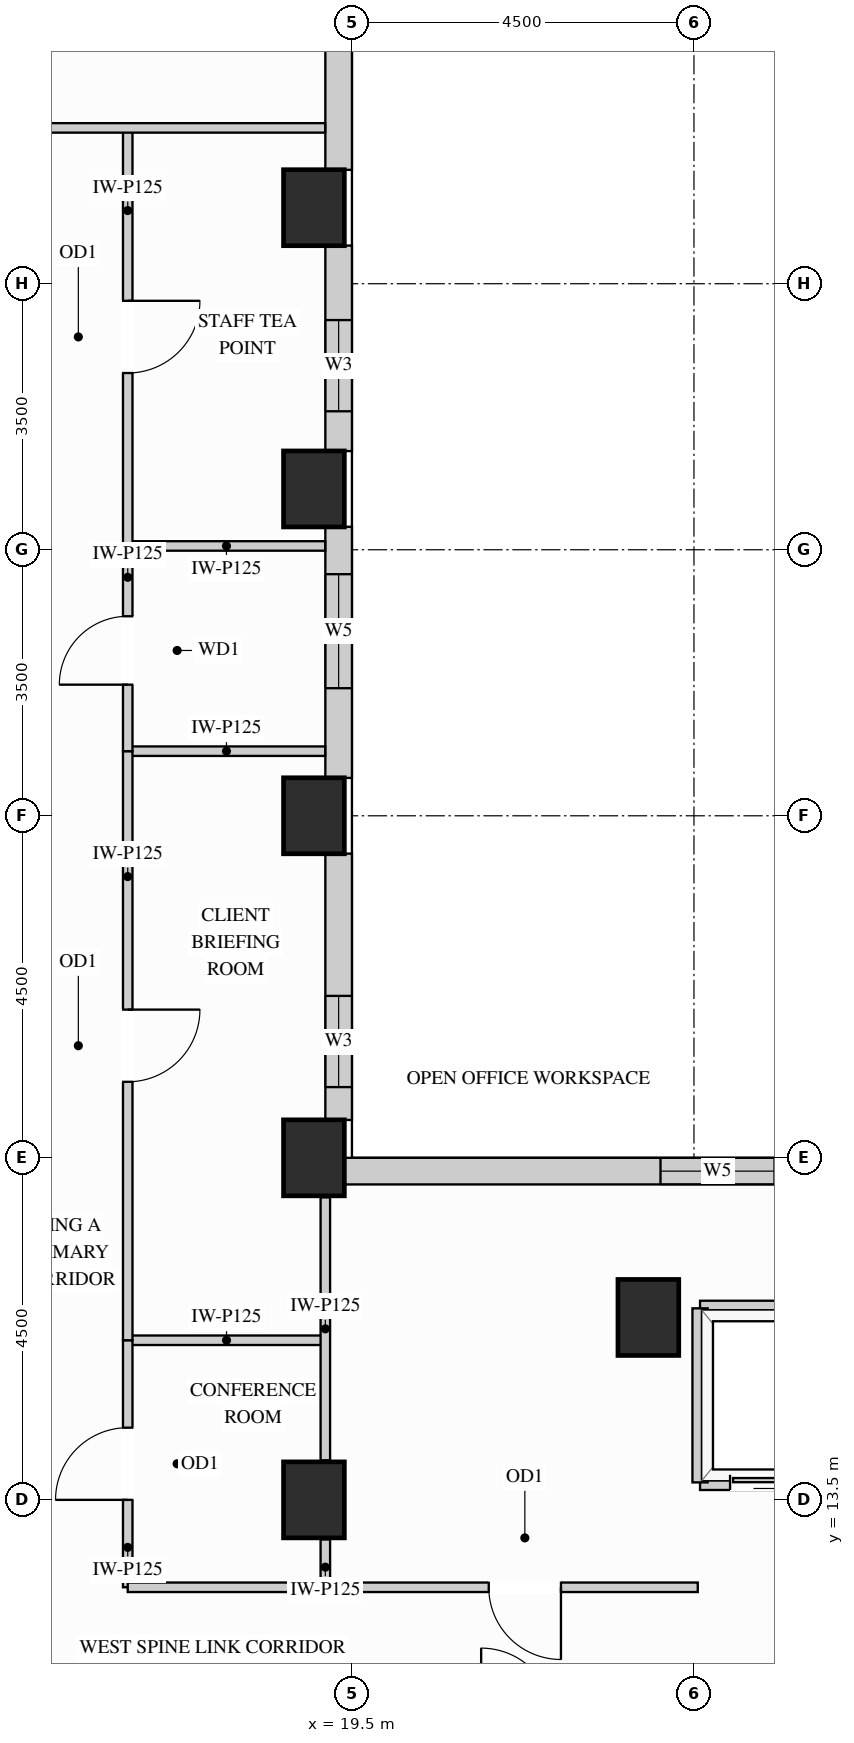
"""IFC4 building model, lengths in metres.
Left out: names, types, materials, properties, quantities, classifications, styles, units other than length and angle.
Written with IfcOpenShell. Run it as: python <this file> out.ifc"""

import sys

from ifc_helpers import new_model, si_unit, direction, frame, frame_2d, origin, origin_2d, place, context, subcontext, project, spatial, rectangle, extrude, source, transform, mapped, element, fill, save


model = new_model("IFC4")
c1 = context("Model", 3, precision=1e-05, world=origin(), true_north=direction((0.0, 1.0)))
c2 = subcontext(c1, "Body", "Model", "MODEL_VIEW")
j1 = project(units=[si_unit("LENGTHUNIT", "METRE"), si_unit("PLANEANGLEUNIT", "RADIAN")], contexts=[c1])
p1 = place(None, origin())
s1 = spatial("IfcSite", under=j1, at=p1, CompositionType="ELEMENT")
p2 = place(p1, origin())
s2 = spatial("IfcBuilding", under=s1, at=p2, CompositionType="ELEMENT")
p3 = place(p2, frame((0.0, 0.0, 189.9)))
s3 = spatial("IfcBuildingStorey", under=s2, at=p3, CompositionType="ELEMENT", Elevation=189.9)
m1 = source(origin(), c2, "Body", "SweptSolid", [
    extrude(rectangle(XDim=0.8, YDim=1.0, at=origin_2d()), origin(), (0.0, 0.0, 1.0), 3.4),
])
for number, where, z_axis, x_axis in (
    (1, (19.0, 13.5, 0.0), (0.0, 0.0, 1.0), (1.0, 0.0, 0.0)),
    (2, (19.0, 18.0, 0.0), (0.0, 0.0, 1.0), (1.0, 0.0, 0.0)),
    (3, (19.0, 22.5, 0.0), (0.0, 0.0, 1.0), (1.0, 0.0, 0.0)),
    (4, (19.0, 26.8, 0.0), (0.0, 0.0, 1.0), (1.0, 0.0, 0.0)),
    (5, (19.0, 30.5, 0.0), (0.0, 0.0, 1.0), (1.0, 0.0, 0.0)),
    (6, (23.4, 15.9, 0.0), (0.0, 0.0, 1.0), (1.0, 0.0, 0.0)),
):
    element("IfcColumn", number, at=place(p3, frame(where, z_axis=z_axis, x_axis=x_axis)), inside=s3, PredefinedType="COLUMN", context=c2, shape_type="MappedRepresentation", body=[
        mapped(m1, transform((0.0, 0.0, 0.0), x_axis=(1.0, 0.0, 0.0), y_axis=(0.0, 1.0, 0.0), z_axis=(0.0, 0.0, 1.0))),
    ])
p4 = place(p3, frame((34.502, 17.825, 0.0), z_axis=(0.0, 0.0, 1.0), x_axis=(-1.0, 0.0, 0.0)))
e7 = element("IfcWall", 7, at=p4, inside=s3, PredefinedType="SOLIDWALL", context=c2, shape_type="SweptSolid", body=[
    extrude(rectangle(XDim=15.104, YDim=0.35, at=frame_2d((7.552, 0.0))), origin(), (0.0, 0.0, 1.0), 3.385),
])
p5 = place(p4, frame((4.131, 0.0, 0.78)))
e8 = element("IfcOpeningElement", 8, at=p5, cuts=e7, PredefinedType="OPENING", context=c2, shape_type="SweptSolid", body=[
    extrude(rectangle(XDim=1.5, YDim=2.0, at=frame_2d((0.75, 1.0))), frame((0.0, 0.185, 0.0), z_axis=(0.0, -1.0, 0.0), x_axis=(1.0, 0.0, 0.0)), (0.0, 0.0, 1.0), 0.37),
])
p6 = place(p4, frame((9.442, 0.0, 0.78)))
e9 = element("IfcOpeningElement", 9, at=p6, cuts=e7, PredefinedType="OPENING", context=c2, shape_type="SweptSolid", body=[
    extrude(rectangle(XDim=1.5, YDim=2.0, at=frame_2d((0.75, 1.0))), frame((0.0, 0.185, 0.0), z_axis=(0.0, -1.0, 0.0), x_axis=(1.0, 0.0, 0.0)), (0.0, 0.0, 1.0), 0.37),
])
p7 = place(p3, frame((19.325, 18.498, 0.0), z_axis=(0.0, 0.0, 1.0), x_axis=(0.0, 1.0, 0.0)))
e10 = element("IfcWall", 10, at=p7, inside=s3, PredefinedType="SOLIDWALL", context=c2, shape_type="SweptSolid", body=[
    extrude(rectangle(XDim=3.504, YDim=0.35, at=frame_2d((1.752, 0.0))), origin(), (0.0, 0.0, 1.0), 2.612),
])
p8 = place(p7, frame((0.433, 0.0, 0.78)))
e11 = element("IfcOpeningElement", 11, at=p8, cuts=e10, PredefinedType="OPENING", context=c2, shape_type="SweptSolid", body=[
    extrude(rectangle(XDim=1.2, YDim=1.652, at=frame_2d((0.6, 0.826))), frame((0.0, 0.185, 0.0), z_axis=(0.0, -1.0, 0.0), x_axis=(1.0, 0.0, 0.0)), (0.0, 0.0, 1.0), 0.37),
])
p9 = place(p3, frame((19.325, 22.998, 0.0), z_axis=(0.0, 0.0, 1.0), x_axis=(0.0, 1.0, 0.0)))
e12 = element("IfcWall", 12, at=p9, inside=s3, PredefinedType="SOLIDWALL", context=c2, shape_type="SweptSolid", body=[
    extrude(rectangle(XDim=3.304, YDim=0.35, at=frame_2d((1.652, 0.0))), origin(), (0.0, 0.0, 1.0), 2.612),
])
p10 = place(p9, frame((1.18, 0.0, 0.78)))
e13 = element("IfcOpeningElement", 13, at=p10, cuts=e12, PredefinedType="OPENING", context=c2, shape_type="SweptSolid", body=[
    extrude(rectangle(XDim=1.5, YDim=1.652, at=frame_2d((0.75, 0.826))), frame((0.0, 0.185, 0.0), z_axis=(0.0, -1.0, 0.0), x_axis=(1.0, 0.0, 0.0)), (0.0, 0.0, 1.0), 0.37),
])
p11 = place(p3, frame((19.325, 27.298, 0.0), z_axis=(0.0, 0.0, 1.0), x_axis=(0.0, 1.0, 0.0)))
e14 = element("IfcWall", 14, at=p11, inside=s3, PredefinedType="SOLIDWALL", context=c2, shape_type="SweptSolid", body=[
    extrude(rectangle(XDim=2.704, YDim=0.35, at=frame_2d((1.352, 0.0))), origin(), (0.0, 0.0, 1.0), 2.612),
])
p12 = place(p11, frame((0.524, 0.0, 0.78)))
e15 = element("IfcOpeningElement", 15, at=p12, cuts=e14, PredefinedType="OPENING", context=c2, shape_type="SweptSolid", body=[
    extrude(rectangle(XDim=1.2, YDim=1.652, at=frame_2d((0.6, 0.826))), frame((0.0, 0.185, 0.0), z_axis=(0.0, -1.0, 0.0), x_axis=(1.0, 0.0, 0.0)), (0.0, 0.0, 1.0), 0.37),
])
m2 = source(origin(), c2, "Body", "SweptSolid", [
    extrude(rectangle(XDim=3.504, YDim=0.35, at=frame_2d((1.752, 0.0))), origin(), (0.0, 0.0, 1.0), 2.612),
])
p13 = place(p3, frame((19.325, 30.998, 0.0), z_axis=(0.0, 0.0, 1.0), x_axis=(0.0, 1.0, 0.0)))
e16 = element("IfcWall", 16, at=p13, inside=s3, PredefinedType="SOLIDWALL", context=c2, shape_type="MappedRepresentation", body=[
    mapped(m2, transform((0.0, 0.0, 0.0), x_axis=(1.0, 0.0, 0.0), y_axis=(0.0, 1.0, 0.0), z_axis=(0.0, 0.0, 1.0))),
])
m3 = source(origin(), c2, "Body", "SweptSolid", [
    extrude(rectangle(XDim=2.6, YDim=0.125, at=frame_2d((1.3, 0.0))), origin(), (0.0, 0.0, 1.0), 3.385),
])
p14 = place(p3, frame((16.55, 15.6, 0.0), z_axis=(0.0, 0.0, 1.0), x_axis=(1.0, 0.0, 0.0)))
e17 = element("IfcWall", 17, at=p14, inside=s3, PredefinedType="PARTITIONING", context=c2, shape_type="MappedRepresentation", body=[
    mapped(m3, transform((0.0, 0.0, 0.0), x_axis=(1.0, 0.0, 0.0), y_axis=(0.0, 1.0, 0.0), z_axis=(0.0, 0.0, 1.0))),
])
m4 = source(origin(), c2, "Body", "SweptSolid", [
    extrude(rectangle(XDim=2.598, YDim=0.125, at=frame_2d((1.299, 0.0))), origin(), (0.0, 0.0, 1.0), 3.385),
])
for number, where, z_axis, x_axis in (
    (18, (16.55, 23.35, 0.0), (0.0, 0.0, 1.0), (1.0, 0.0, 0.0)),
    (19, (16.55, 26.05, 0.0), (0.0, 0.0, 1.0), (1.0, 0.0, 0.0)),
):
    element("IfcWall", number, at=place(p3, frame(where, z_axis=z_axis, x_axis=x_axis)), inside=s3, PredefinedType="PARTITIONING", context=c2, shape_type="MappedRepresentation", body=[
        mapped(m4, transform((0.0, 0.0, 0.0), x_axis=(1.0, 0.0, 0.0), y_axis=(0.0, 1.0, 0.0), z_axis=(0.0, 0.0, 1.0))),
    ])
m5 = source(origin(), c2, "Body", "SweptSolid", [
    extrude(rectangle(XDim=0.63, YDim=0.125, at=frame_2d((0.315, 0.0))), origin(), (0.0, 0.0, 1.0), 2.773),
])
p15 = place(p3, frame((19.15, 12.35, 0.0), z_axis=(0.0, 0.0, 1.0), x_axis=(0.0, 1.0, 0.0)))
e20 = element("IfcWall", 20, at=p15, inside=s3, PredefinedType="PARTITIONING", context=c2, shape_type="MappedRepresentation", body=[
    mapped(m5, transform((0.0, 0.0, 0.0), x_axis=(1.0, 0.0, 0.0), y_axis=(0.0, 1.0, 0.0), z_axis=(0.0, 0.0, 1.0))),
])
m6 = source(origin(), c2, "Body", "SweptSolid", [
    extrude(rectangle(XDim=3.46, YDim=0.125, at=frame_2d((1.73, 0.0))), origin(), (0.0, 0.0, 1.0), 2.773),
])
p16 = place(p3, frame((19.15, 14.02, 0.0), z_axis=(0.0, 0.0, 1.0), x_axis=(0.0, 1.0, 0.0)))
e21 = element("IfcWall", 21, at=p16, inside=s3, PredefinedType="PARTITIONING", context=c2, shape_type="MappedRepresentation", body=[
    mapped(m6, transform((0.0, 0.0, 0.0), x_axis=(1.0, 0.0, 0.0), y_axis=(0.0, 1.0, 0.0), z_axis=(0.0, 0.0, 1.0))),
])
p17 = place(p3, frame((16.55, 12.35, 0.0), z_axis=(0.0, 0.0, 1.0), x_axis=(0.0, 1.0, 0.0)))
e22 = element("IfcWall", 22, at=p17, inside=s3, PredefinedType="PARTITIONING", context=c2, shape_type="SweptSolid", body=[
    extrude(rectangle(XDim=3.25, YDim=0.125, at=frame_2d((1.625, 0.0))), origin(), (0.0, 0.0, 1.0), 3.385),
])
p18 = place(p17, frame((1.15, 0.0, 0.0)))
e23 = element("IfcOpeningElement", 23, at=p18, cuts=e22, PredefinedType="OPENING", context=c2, shape_type="SweptSolid", body=[
    extrude(rectangle(XDim=0.95, YDim=2.15, at=frame_2d((0.475, 1.075))), frame((0.0, 0.073, 0.0), z_axis=(0.0, -1.0, 0.0), x_axis=(1.0, 0.0, 0.0)), (0.0, 0.0, 1.0), 0.145),
])
p19 = place(p3, frame((16.55, 15.6, 0.0), z_axis=(0.0, 0.0, 1.0), x_axis=(0.0, 1.0, 0.0)))
e24 = element("IfcWall", 24, at=p19, inside=s3, PredefinedType="PARTITIONING", context=c2, shape_type="SweptSolid", body=[
    extrude(rectangle(XDim=7.75, YDim=0.125, at=frame_2d((3.875, 0.0))), origin(), (0.0, 0.0, 1.0), 3.385),
])
p20 = place(p19, frame((3.4, 0.0, 0.0)))
e25 = element("IfcOpeningElement", 25, at=p20, cuts=e24, PredefinedType="OPENING", context=c2, shape_type="SweptSolid", body=[
    extrude(rectangle(XDim=0.95, YDim=2.15, at=frame_2d((0.475, 1.075))), frame((0.0, 0.073, 0.0), z_axis=(0.0, -1.0, 0.0), x_axis=(1.0, 0.0, 0.0)), (0.0, 0.0, 1.0), 0.145),
])
p21 = place(p3, frame((16.55, 26.05, 0.0), z_axis=(0.0, 0.0, 1.0), x_axis=(0.0, 1.0, 0.0)))
e26 = element("IfcWall", 26, at=p21, inside=s3, PredefinedType="PARTITIONING", context=c2, shape_type="SweptSolid", body=[
    extrude(rectangle(XDim=5.5, YDim=0.125, at=frame_2d((2.75, 0.0))), origin(), (0.0, 0.0, 1.0), 3.385),
])
p22 = place(p21, frame((2.275, 0.0, 0.0)))
e27 = element("IfcOpeningElement", 27, at=p22, cuts=e26, PredefinedType="OPENING", context=c2, shape_type="SweptSolid", body=[
    extrude(rectangle(XDim=0.95, YDim=2.15, at=frame_2d((0.475, 1.075))), frame((0.0, 0.073, 0.0), z_axis=(0.0, -1.0, 0.0), x_axis=(1.0, 0.0, 0.0)), (0.0, 0.0, 1.0), 0.145),
])
p23 = place(p3, frame((16.55, 23.35, 0.0), z_axis=(0.0, 0.0, 1.0), x_axis=(0.0, 1.0, 0.0)))
e28 = element("IfcWall", 28, at=p23, inside=s3, PredefinedType="PARTITIONING", context=c2, shape_type="SweptSolid", body=[
    extrude(rectangle(XDim=2.7, YDim=0.125, at=frame_2d((1.35, 0.0))), origin(), (0.0, 0.0, 1.0), 3.385),
])
p24 = place(p23, frame((0.875, 0.0, 0.0)))
e29 = element("IfcOpeningElement", 29, at=p24, cuts=e28, PredefinedType="OPENING", context=c2, shape_type="SweptSolid", body=[
    extrude(rectangle(XDim=0.9, YDim=2.15, at=frame_2d((0.45, 1.075))), frame((0.0, 0.073, 0.0), z_axis=(0.0, -1.0, 0.0), x_axis=(1.0, 0.0, 0.0)), (0.0, 0.0, 1.0), 0.145),
])
m7 = source(origin(), c2, "Body", "SweptSolid", [
    extrude(rectangle(XDim=12.598, YDim=0.125, at=frame_2d((6.299, 0.0))), origin(), (0.0, 0.0, 1.0), 3.385),
])
p25 = place(p3, frame((6.55, 31.55, 0.0), z_axis=(0.0, 0.0, 1.0), x_axis=(1.0, 0.0, 0.0)))
e30 = element("IfcWall", 30, at=p25, inside=s3, PredefinedType="PARTITIONING", context=c2, shape_type="MappedRepresentation", body=[
    mapped(m7, transform((0.0, 0.0, 0.0), x_axis=(1.0, 0.0, 0.0), y_axis=(0.0, 1.0, 0.0), z_axis=(0.0, 0.0, 1.0))),
])
m8 = source(origin(), c2, "Body", "SweptSolid", [
    extrude(rectangle(XDim=2.95, YDim=0.125, at=frame_2d((1.475, 0.0))), origin(), (0.0, 0.0, 1.0), 3.385),
])
p26 = place(p3, frame((16.55, 12.35, 0.0), z_axis=(0.0, 0.0, 1.0), x_axis=(1.0, 0.0, 0.0)))
e31 = element("IfcWall", 31, at=p26, inside=s3, PredefinedType="PARTITIONING", context=c2, shape_type="MappedRepresentation", body=[
    mapped(m8, transform((0.0, 0.0, 0.0), x_axis=(1.0, 0.0, 0.0), y_axis=(0.0, 1.0, 0.0), z_axis=(0.0, 0.0, 1.0))),
])
p27 = place(p3, frame((19.5, 12.35, 0.0), z_axis=(0.0, 0.0, 1.0), x_axis=(1.0, 0.0, 0.0)))
e32 = element("IfcWall", 32, at=p27, inside=s3, PredefinedType="PARTITIONING", context=c2, shape_type="SweptSolid", body=[
    extrude(rectangle(XDim=4.55, YDim=0.125, at=frame_2d((2.275, 0.0))), origin(), (0.0, 0.0, 1.0), 3.385),
])
p28 = place(p27, frame((1.8, 0.0, 0.0)))
e33 = element("IfcOpeningElement", 33, at=p28, cuts=e32, PredefinedType="OPENING", context=c2, shape_type="SweptSolid", body=[
    extrude(rectangle(XDim=0.95, YDim=2.15, at=frame_2d((0.475, 1.075))), frame((0.0, 0.073, 0.0), z_axis=(0.0, -1.0, 0.0), x_axis=(1.0, 0.0, 0.0)), (0.0, 0.0, 1.0), 0.145),
])
m9 = source(origin(), c2, "Body", "SweptSolid", [
    extrude(rectangle(XDim=1.89, YDim=0.2, at=frame_2d((0.945, 0.0))), origin(), (0.0, 0.0, 1.0), 2.773),
])
p29 = place(p3, frame((24.08, 16.02, 0.0), z_axis=(0.0, 0.0, 1.0), x_axis=(1.0, 0.0, 0.0)))
e34 = element("IfcWall", 34, at=p29, inside=s3, PredefinedType="PARTITIONING", context=c2, shape_type="MappedRepresentation", body=[
    mapped(m9, transform((0.0, 0.0, 0.0), x_axis=(1.0, 0.0, 0.0), y_axis=(0.0, 1.0, 0.0), z_axis=(0.0, 0.0, 1.0))),
])
p30 = place(p3, frame((24.08, 13.73, 0.0), z_axis=(0.0, 0.0, 1.0), x_axis=(1.0, 0.0, 0.0)))
e35 = element("IfcWall", 35, at=p30, inside=s3, PredefinedType="PARTITIONING", context=c2, shape_type="SweptSolid", body=[
    extrude(rectangle(XDim=1.89, YDim=0.2, at=frame_2d((0.945, 0.0))), origin(), (0.0, 0.0, 1.0), 2.466),
])
p31 = place(p30, frame((0.395, 0.0, 0.0)))
e36 = element("IfcOpeningElement", 36, at=p31, cuts=e35, PredefinedType="OPENING", context=c2, shape_type="SweptSolid", body=[
    extrude(rectangle(XDim=1.1, YDim=2.2, at=frame_2d((0.55, 1.1))), frame((0.0, 0.11, 0.0), z_axis=(0.0, -1.0, 0.0), x_axis=(1.0, 0.0, 0.0)), (0.0, 0.0, 1.0), 0.22),
])
m10 = source(origin(), c2, "Body", "SweptSolid", [
    extrude(rectangle(XDim=2.29, YDim=0.2, at=frame_2d((1.145, 0.0))), origin(), (0.0, 0.0, 1.0), 3.385),
])
p32 = place(p3, frame((24.08, 13.73, 0.0), z_axis=(0.0, 0.0, 1.0), x_axis=(0.0, 1.0, 0.0)))
e37 = element("IfcWall", 37, at=p32, inside=s3, PredefinedType="PARTITIONING", context=c2, shape_type="MappedRepresentation", body=[
    mapped(m10, transform((0.0, 0.0, 0.0), x_axis=(1.0, 0.0, 0.0), y_axis=(0.0, 1.0, 0.0), z_axis=(0.0, 0.0, 1.0))),
])
m11 = source(origin(), c2, "Body", "SweptSolid", [
    extrude(rectangle(XDim=1.1, YDim=2.2, at=frame_2d((0.55, 1.1))), frame((0.0, 0.025, 0.0), z_axis=(0.0, -1.0, 0.0), x_axis=(1.0, 0.0, 0.0)), (0.0, 0.0, 1.0), 0.05),
])
p33 = place(p31, origin())
e38 = element("IfcDoor", 38, at=p33, inside=s3, OperationType="SLIDING_TO_LEFT", PredefinedType="DOOR", context=c2, shape_type="MappedRepresentation", body=[
    mapped(m11, transform((0.0, 0.0, 0.0), x_axis=(1.0, 0.0, 0.0), y_axis=(0.0, 1.0, 0.0), z_axis=(0.0, 0.0, 1.0))),
])
fill(e36, e38)
m12 = source(origin(), c2, "Body", "SweptSolid", [
    extrude(rectangle(XDim=0.95, YDim=2.15, at=frame_2d((0.475, 1.075))), frame((0.0, 0.025, 0.0), z_axis=(0.0, -1.0, 0.0), x_axis=(1.0, 0.0, 0.0)), (0.0, 0.0, 1.0), 0.05),
])
p34 = place(p18, origin())
e39 = element("IfcDoor", 39, at=p34, inside=s3, OperationType="SINGLE_SWING_LEFT", PredefinedType="DOOR", context=c2, shape_type="MappedRepresentation", body=[
    mapped(m12, transform((0.0, 0.0, 0.0), x_axis=(1.0, 0.0, 0.0), y_axis=(0.0, 1.0, 0.0), z_axis=(0.0, 0.0, 1.0))),
])
fill(e23, e39)
p35 = place(p20, origin())
e40 = element("IfcDoor", 40, at=p35, inside=s3, OperationType="SINGLE_SWING_RIGHT", PredefinedType="DOOR", context=c2, shape_type="MappedRepresentation", body=[
    mapped(m12, transform((0.0, 0.0, 0.0), x_axis=(1.0, 0.0, 0.0), y_axis=(0.0, 1.0, 0.0), z_axis=(0.0, 0.0, 1.0))),
])
fill(e25, e40)
p36 = place(p22, origin())
e41 = element("IfcDoor", 41, at=p36, inside=s3, OperationType="SINGLE_SWING_RIGHT", PredefinedType="DOOR", context=c2, shape_type="MappedRepresentation", body=[
    mapped(m12, transform((0.0, 0.0, 0.0), x_axis=(1.0, 0.0, 0.0), y_axis=(0.0, 1.0, 0.0), z_axis=(0.0, 0.0, 1.0))),
])
fill(e27, e41)
p37 = place(p28, origin())
e42 = element("IfcDoor", 42, at=p37, inside=s3, OperationType="SINGLE_SWING_RIGHT", PredefinedType="DOOR", context=c2, shape_type="MappedRepresentation", body=[
    mapped(m12, transform((0.0, 0.0, 0.0), x_axis=(1.0, 0.0, 0.0), y_axis=(0.0, 1.0, 0.0), z_axis=(0.0, 0.0, 1.0))),
])
fill(e33, e42)
m13 = source(origin(), c2, "Body", "SweptSolid", [
    extrude(rectangle(XDim=0.9, YDim=2.15, at=frame_2d((0.45, 1.075))), frame((0.0, 0.025, 0.0), z_axis=(0.0, -1.0, 0.0), x_axis=(1.0, 0.0, 0.0)), (0.0, 0.0, 1.0), 0.05),
])
p38 = place(p24, origin())
e43 = element("IfcDoor", 43, at=p38, inside=s3, OperationType="SINGLE_SWING_LEFT", PredefinedType="DOOR", context=c2, shape_type="MappedRepresentation", body=[
    mapped(m13, transform((0.0, 0.0, 0.0), x_axis=(1.0, 0.0, 0.0), y_axis=(0.0, 1.0, 0.0), z_axis=(0.0, 0.0, 1.0))),
])
fill(e29, e43)
m14 = source(origin(), c2, "Body", "SweptSolid", [
    extrude(rectangle(XDim=1.2, YDim=1.652, at=frame_2d((0.6, 0.826))), frame((0.0, 0.03, 0.0), z_axis=(0.0, -1.0, 0.0), x_axis=(1.0, 0.0, 0.0)), (0.0, 0.0, 1.0), 0.06),
])
p39 = place(p8, origin())
e44 = element("IfcWindow", 44, at=p39, inside=s3, PartitioningType="SINGLE_PANEL", PredefinedType="WINDOW", context=c2, shape_type="MappedRepresentation", body=[
    mapped(m14, transform((0.0, 0.0, 0.0), x_axis=(1.0, 0.0, 0.0), y_axis=(0.0, 1.0, 0.0), z_axis=(0.0, 0.0, 1.0))),
])
fill(e11, e44)
p40 = place(p12, origin())
e45 = element("IfcWindow", 45, at=p40, inside=s3, PartitioningType="SINGLE_PANEL", PredefinedType="WINDOW", context=c2, shape_type="MappedRepresentation", body=[
    mapped(m14, transform((0.0, 0.0, 0.0), x_axis=(1.0, 0.0, 0.0), y_axis=(0.0, 1.0, 0.0), z_axis=(0.0, 0.0, 1.0))),
])
fill(e15, e45)
m15 = source(origin(), c2, "Body", "SweptSolid", [
    extrude(rectangle(XDim=1.5, YDim=2.0, at=frame_2d((0.75, 1.0))), frame((0.0, 0.03, 0.0), z_axis=(0.0, -1.0, 0.0), x_axis=(1.0, 0.0, 0.0)), (0.0, 0.0, 1.0), 0.06),
])
p41 = place(p6, origin())
e46 = element("IfcWindow", 46, at=p41, inside=s3, PartitioningType="SINGLE_PANEL", PredefinedType="WINDOW", context=c2, shape_type="MappedRepresentation", body=[
    mapped(m15, transform((0.0, 0.0, 0.0), x_axis=(1.0, 0.0, 0.0), y_axis=(0.0, 1.0, 0.0), z_axis=(0.0, 0.0, 1.0))),
])
fill(e9, e46)
m16 = source(origin(), c2, "Body", "SweptSolid", [
    extrude(rectangle(XDim=1.5, YDim=1.652, at=frame_2d((0.75, 0.826))), frame((0.0, 0.03, 0.0), z_axis=(0.0, -1.0, 0.0), x_axis=(1.0, 0.0, 0.0)), (0.0, 0.0, 1.0), 0.06),
])
p42 = place(p10, origin())
e47 = element("IfcWindow", 47, at=p42, inside=s3, PartitioningType="SINGLE_PANEL", PredefinedType="WINDOW", context=c2, shape_type="MappedRepresentation", body=[
    mapped(m16, transform((0.0, 0.0, 0.0), x_axis=(1.0, 0.0, 0.0), y_axis=(0.0, 1.0, 0.0), z_axis=(0.0, 0.0, 1.0))),
])
fill(e13, e47)
save(model, sys.argv[1])
